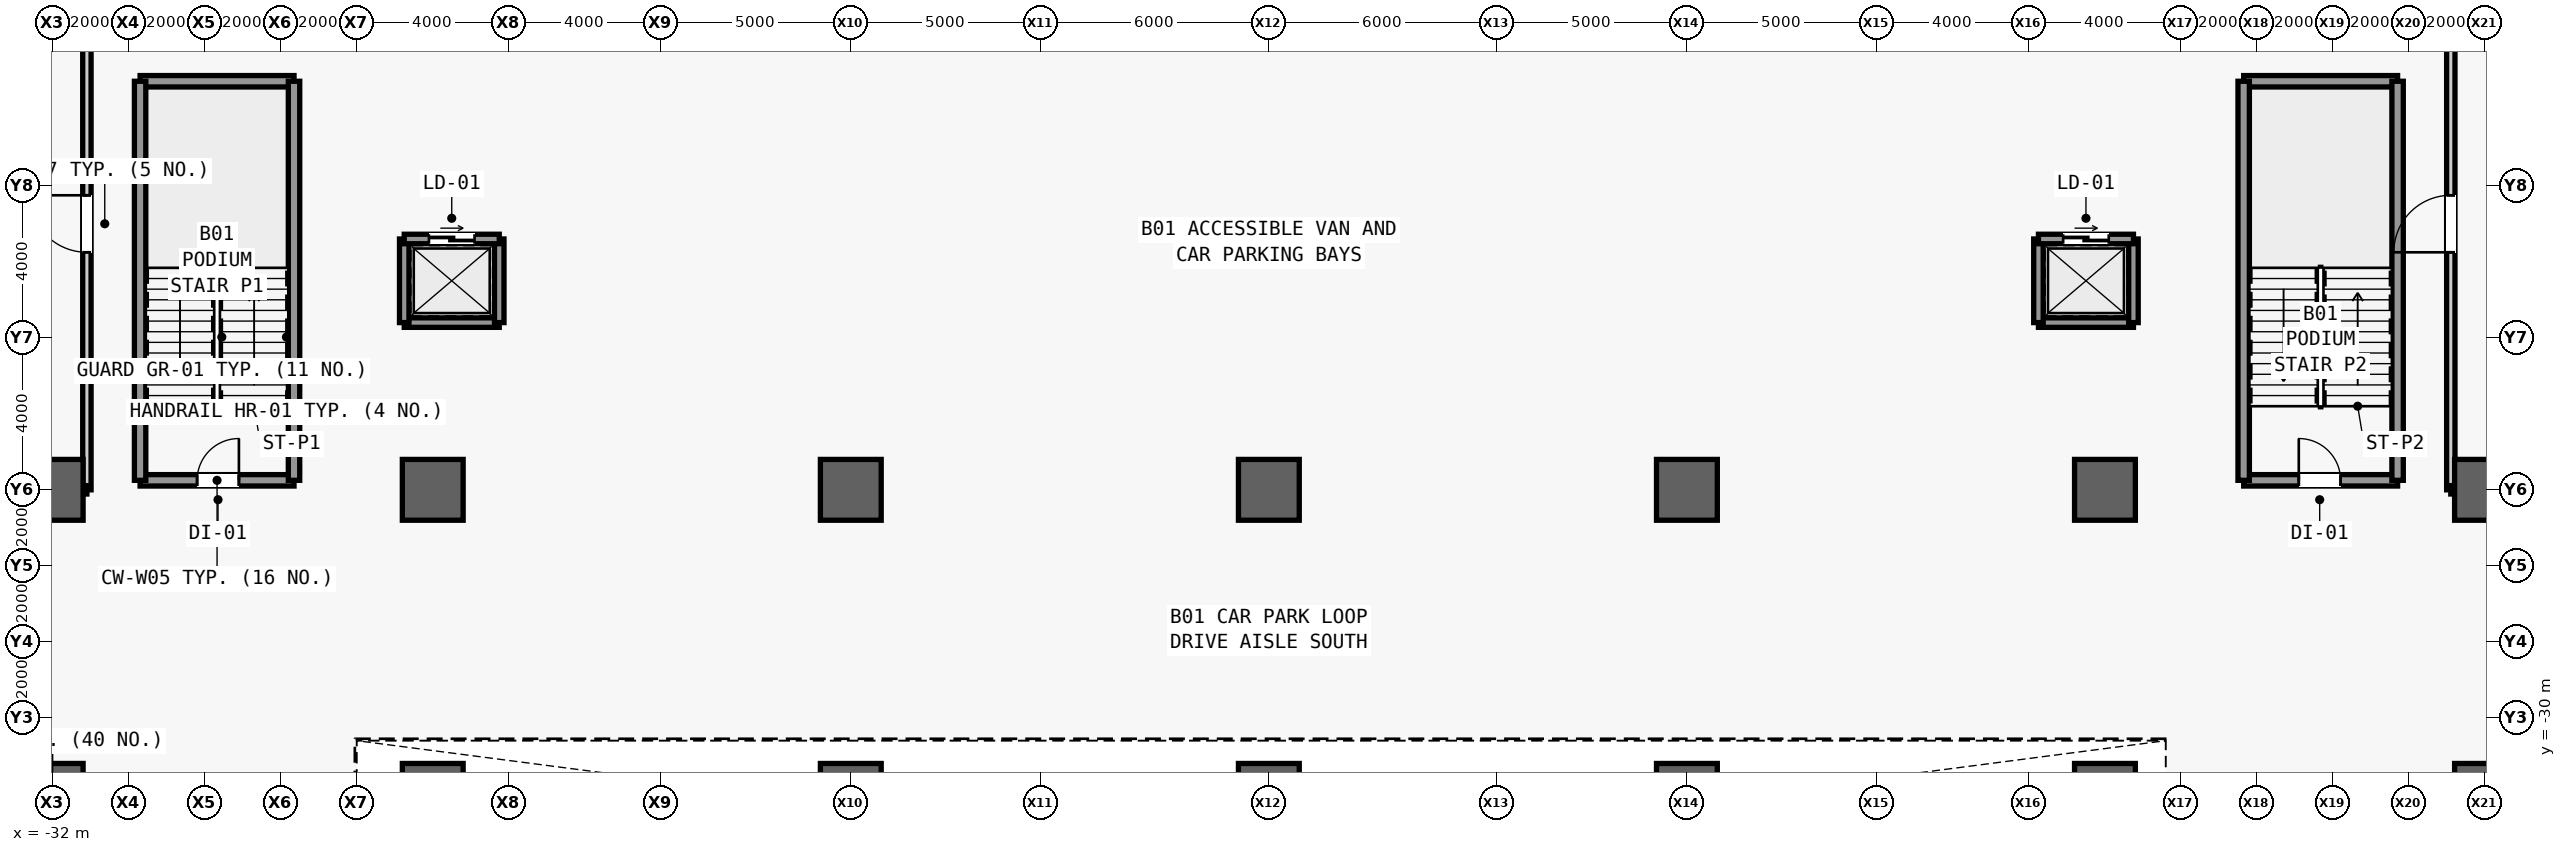
"""IFC4 building model, lengths in metres.
Left out: names, types, materials, properties, quantities, classifications, styles, units other than length and angle.
Written with IfcOpenShell. Run it as: python <this file> out.ifc"""

import sys

from ifc_helpers import new_model, si_unit, direction, frame, frame_2d, origin, origin_2d, place, context, subcontext, project, spatial, rectangle, extrude, source, transform, mapped, element, fill, save


model = new_model("IFC4")
c1 = context("Model", 3, precision=1e-05, world=origin(), true_north=direction((0.0, 1.0)))
c2 = subcontext(c1, "Body", "Model", "MODEL_VIEW")
j1 = project(units=[si_unit("LENGTHUNIT", "METRE"), si_unit("PLANEANGLEUNIT", "RADIAN")], contexts=[c1])
p1 = place(None, origin())
s1 = spatial("IfcSite", under=j1, at=p1, CompositionType="ELEMENT")
p2 = place(p1, origin())
s2 = spatial("IfcBuilding", under=s1, at=p2, CompositionType="ELEMENT")
p3 = place(p2, frame((0.0, 0.0, -4.8)))
s3 = spatial("IfcBuildingStorey", under=s2, at=p3, CompositionType="ELEMENT", Elevation=-4.8)
m1 = source(origin(), c2, "Body", "SweptSolid", [
    extrude(rectangle(XDim=1.6, YDim=1.6, at=origin_2d()), origin(), (0.0, 0.0, 1.0), 4.8),
])
for number, where, z_axis, x_axis in (
    (1, (-32.0, -32.0, 0.0), (0.0, 0.0, 1.0), (1.0, 0.0, 0.0)),
    (2, (-32.0, -24.0, 0.0), (0.0, 0.0, 1.0), (1.0, 0.0, 0.0)),
    (3, (-22.0, -32.0, 0.0), (0.0, 0.0, 1.0), (1.0, 0.0, 0.0)),
    (4, (-22.0, -24.0, 0.0), (0.0, 0.0, 1.0), (1.0, 0.0, 0.0)),
    (5, (-11.0, -32.0, 0.0), (0.0, 0.0, 1.0), (1.0, 0.0, 0.0)),
    (6, (-11.0, -24.0, 0.0), (0.0, 0.0, 1.0), (1.0, 0.0, 0.0)),
    (7, (0.0, -32.0, 0.0), (0.0, 0.0, 1.0), (1.0, 0.0, 0.0)),
    (8, (0.0, -24.0, 0.0), (0.0, 0.0, 1.0), (1.0, 0.0, 0.0)),
    (9, (11.0, -32.0, 0.0), (0.0, 0.0, 1.0), (1.0, 0.0, 0.0)),
    (10, (11.0, -24.0, 0.0), (0.0, 0.0, 1.0), (1.0, 0.0, 0.0)),
    (11, (22.0, -32.0, 0.0), (0.0, 0.0, 1.0), (1.0, 0.0, 0.0)),
    (12, (22.0, -24.0, 0.0), (0.0, 0.0, 1.0), (1.0, 0.0, 0.0)),
    (13, (32.0, -32.0, 0.0), (0.0, 0.0, 1.0), (1.0, 0.0, 0.0)),
    (14, (32.0, -24.0, 0.0), (0.0, 0.0, 1.0), (1.0, 0.0, 0.0)),
):
    element("IfcColumn", number, at=place(p3, frame(where, z_axis=z_axis, x_axis=x_axis)), inside=s3, PredefinedType="COLUMN", context=c2, shape_type="MappedRepresentation", body=[
        mapped(m1, transform((0.0, 0.0, 0.0), scale=1.0)),
    ])
m2 = source(origin(), c2, "Body", "SweptSolid", [
    extrude(rectangle(XDim=4.05, YDim=0.3, at=frame_2d((2.025, 0.0))), origin(), (0.0, 0.0, 1.0), 4.48),
])
p4 = place(p3, frame((-29.7, -23.75, 0.0), z_axis=(0.0, 0.0, 1.0), x_axis=(1.0, 0.0, 0.0)))
e15 = element("IfcWall", 15, at=p4, inside=s3, PredefinedType="SHEAR", context=c2, shape_type="MappedRepresentation", body=[
    mapped(m2, transform((0.0, 0.0, 0.0), scale=1.0)),
])
m3 = source(origin(), c2, "Body", "SweptSolid", [
    extrude(rectangle(XDim=1.1, YDim=2.2, at=frame_2d((0.55, 1.1))), frame((0.0, 0.16, 0.0), z_axis=(0.0, -1.0, 0.0), x_axis=(1.0, 0.0, 0.0)), (0.0, 0.0, 1.0), 0.32),
])
p5 = place(p4, frame((1.5, 0.0, 0.0)))
e16 = element("IfcOpeningElement", 16, at=p5, cuts=e15, PredefinedType="OPENING", context=c2, shape_type="MappedRepresentation", body=[
    mapped(m3, transform((0.0, 0.0, 0.0), scale=1.0)),
])
p6 = place(p3, frame((-29.7, -13.25, 0.0), z_axis=(0.0, 0.0, 1.0), x_axis=(1.0, 0.0, 0.0)))
e17 = element("IfcWall", 17, at=p6, inside=s3, PredefinedType="SHEAR", context=c2, shape_type="MappedRepresentation", body=[
    mapped(m2, transform((0.0, 0.0, 0.0), scale=1.0)),
])
m4 = source(origin(), c2, "Body", "SweptSolid", [
    extrude(rectangle(XDim=10.5, YDim=0.3, at=frame_2d((5.25, 0.0))), origin(), (0.0, 0.0, 1.0), 4.48),
])
for number, where, z_axis, x_axis in (
    (18, (-29.7, -23.75, 0.0), (0.0, 0.0, 1.0), (0.0, 1.0, 0.0)),
    (19, (-25.65, -23.75, 0.0), (0.0, 0.0, 1.0), (0.0, 1.0, 0.0)),
):
    element("IfcWall", number, at=place(p3, frame(where, z_axis=z_axis, x_axis=x_axis)), inside=s3, PredefinedType="SHEAR", context=c2, shape_type="MappedRepresentation", body=[
        mapped(m4, transform((0.0, 0.0, 0.0), scale=1.0)),
    ])
p7 = place(p3, frame((25.65, -23.75, 0.0), z_axis=(0.0, 0.0, 1.0), x_axis=(1.0, 0.0, 0.0)))
e20 = element("IfcWall", 20, at=p7, inside=s3, PredefinedType="SHEAR", context=c2, shape_type="MappedRepresentation", body=[
    mapped(m2, transform((0.0, 0.0, 0.0), scale=1.0)),
])
p8 = place(p7, frame((1.45, 0.0, 0.0)))
e21 = element("IfcOpeningElement", 21, at=p8, cuts=e20, PredefinedType="OPENING", context=c2, shape_type="MappedRepresentation", body=[
    mapped(m3, transform((0.0, 0.0, 0.0), scale=1.0)),
])
p9 = place(p3, frame((25.65, -13.25, 0.0), z_axis=(0.0, 0.0, 1.0), x_axis=(1.0, 0.0, 0.0)))
e22 = element("IfcWall", 22, at=p9, inside=s3, PredefinedType="SHEAR", context=c2, shape_type="MappedRepresentation", body=[
    mapped(m2, transform((0.0, 0.0, 0.0), scale=1.0)),
])
for number, where, z_axis, x_axis in (
    (23, (25.65, -23.75, 0.0), (0.0, 0.0, 1.0), (0.0, 1.0, 0.0)),
    (24, (29.7, -23.75, 0.0), (0.0, 0.0, 1.0), (0.0, 1.0, 0.0)),
):
    element("IfcWall", number, at=place(p3, frame(where, z_axis=z_axis, x_axis=x_axis)), inside=s3, PredefinedType="SHEAR", context=c2, shape_type="MappedRepresentation", body=[
        mapped(m4, transform((0.0, 0.0, 0.0), scale=1.0)),
    ])
m5 = source(origin(), c2, "Body", "SweptSolid", [
    extrude(rectangle(XDim=2.5, YDim=0.25, at=frame_2d((1.25, 0.0))), origin(), (0.0, 0.0, 1.0), 4.48),
])
p10 = place(p3, frame((-22.75, -19.6, 0.0), z_axis=(0.0, 0.0, 1.0), x_axis=(1.0, 0.0, 0.0)))
e25 = element("IfcWall", 25, at=p10, inside=s3, PredefinedType="SHEAR", context=c2, shape_type="MappedRepresentation", body=[
    mapped(m5, transform((0.0, 0.0, 0.0), scale=1.0)),
])
m6 = source(origin(), c2, "Body", "SweptSolid", [
    extrude(rectangle(XDim=2.2, YDim=0.25, at=frame_2d((1.1, 0.0))), origin(), (0.0, 0.0, 1.0), 4.48),
])
for number, where, z_axis, x_axis in (
    (26, (-22.75, -19.6, 0.0), (0.0, 0.0, 1.0), (0.0, 1.0, 0.0)),
    (27, (-20.25, -19.6, 0.0), (0.0, 0.0, 1.0), (0.0, 1.0, 0.0)),
):
    element("IfcWall", number, at=place(p3, frame(where, z_axis=z_axis, x_axis=x_axis)), inside=s3, PredefinedType="SHEAR", context=c2, shape_type="MappedRepresentation", body=[
        mapped(m6, transform((0.0, 0.0, 0.0), scale=1.0)),
    ])
p11 = place(p3, frame((-22.75, -17.4, 0.0), z_axis=(0.0, 0.0, 1.0), x_axis=(1.0, 0.0, 0.0)))
e28 = element("IfcWall", 28, at=p11, inside=s3, PredefinedType="SHEAR", context=c2, shape_type="MappedRepresentation", body=[
    mapped(m5, transform((0.0, 0.0, 0.0), scale=1.0)),
])
m7 = source(origin(), c2, "Body", "SweptSolid", [
    extrude(rectangle(XDim=1.2, YDim=2.3, at=frame_2d((0.6, 1.15))), frame((0.0, 0.135, 0.0), z_axis=(0.0, -1.0, 0.0), x_axis=(1.0, 0.0, 0.0)), (0.0, 0.0, 1.0), 0.27),
])
p12 = place(p11, frame((0.65, 0.0, 0.0)))
e29 = element("IfcOpeningElement", 29, at=p12, cuts=e28, PredefinedType="OPENING", context=c2, shape_type="MappedRepresentation", body=[
    mapped(m7, transform((0.0, 0.0, 0.0), scale=1.0)),
])
p13 = place(p3, frame((20.25, -19.6, 0.0), z_axis=(0.0, 0.0, 1.0), x_axis=(1.0, 0.0, 0.0)))
e30 = element("IfcWall", 30, at=p13, inside=s3, PredefinedType="SHEAR", context=c2, shape_type="MappedRepresentation", body=[
    mapped(m5, transform((0.0, 0.0, 0.0), scale=1.0)),
])
for number, where, z_axis, x_axis in (
    (31, (20.25, -19.6, 0.0), (0.0, 0.0, 1.0), (0.0, 1.0, 0.0)),
    (32, (22.75, -19.6, 0.0), (0.0, 0.0, 1.0), (0.0, 1.0, 0.0)),
):
    element("IfcWall", number, at=place(p3, frame(where, z_axis=z_axis, x_axis=x_axis)), inside=s3, PredefinedType="SHEAR", context=c2, shape_type="MappedRepresentation", body=[
        mapped(m6, transform((0.0, 0.0, 0.0), scale=1.0)),
    ])
p14 = place(p3, frame((20.25, -17.4, 0.0), z_axis=(0.0, 0.0, 1.0), x_axis=(1.0, 0.0, 0.0)))
e33 = element("IfcWall", 33, at=p14, inside=s3, PredefinedType="SHEAR", context=c2, shape_type="MappedRepresentation", body=[
    mapped(m5, transform((0.0, 0.0, 0.0), scale=1.0)),
])
p15 = place(p14, frame((0.65, 0.0, 0.0)))
e34 = element("IfcOpeningElement", 34, at=p15, cuts=e33, PredefinedType="OPENING", context=c2, shape_type="MappedRepresentation", body=[
    mapped(m7, transform((0.0, 0.0, 0.0), scale=1.0)),
])
m8 = source(origin(), c2, "Body", "SweptSolid", [
    extrude(rectangle(XDim=48.0, YDim=0.22, at=frame_2d((24.0, 0.0))), origin(), (0.0, 0.0, 1.0), 4.48),
])
p16 = place(p3, frame((-31.1, -24.0, 0.0), z_axis=(0.0, 0.0, 1.0), x_axis=(0.0, 1.0, 0.0)))
e35 = element("IfcWall", 35, at=p16, inside=s3, PredefinedType="PARTITIONING", context=c2, shape_type="MappedRepresentation", body=[
    mapped(m8, transform((0.0, 0.0, 0.0), scale=1.0)),
])
m9 = source(origin(), c2, "Body", "SweptSolid", [
    extrude(rectangle(XDim=1.5, YDim=2.3, at=frame_2d((0.75, 1.15))), frame((0.0, 0.12, 0.0), z_axis=(0.0, -1.0, 0.0), x_axis=(1.0, 0.0, 0.0)), (0.0, 0.0, 1.0), 0.24),
])
p17 = place(p16, frame((6.25, 0.0, 0.0)))
e36 = element("IfcOpeningElement", 36, at=p17, cuts=e35, PredefinedType="OPENING", context=c2, shape_type="MappedRepresentation", body=[
    mapped(m9, transform((0.0, 0.0, 0.0), scale=1.0)),
])
p18 = place(p16, frame((28.75, 0.0, 0.0)))
e37 = element("IfcOpeningElement", 37, at=p18, cuts=e35, PredefinedType="OPENING", context=c2, shape_type="MappedRepresentation", body=[
    mapped(m9, transform((0.0, 0.0, 0.0), scale=1.0)),
])
p19 = place(p16, frame((40.25, 0.0, 0.0)))
e38 = element("IfcOpeningElement", 38, at=p19, cuts=e35, PredefinedType="OPENING", context=c2, shape_type="MappedRepresentation", body=[
    mapped(m9, transform((0.0, 0.0, 0.0), scale=1.0)),
])
m10 = source(origin(), c2, "Body", "SweptSolid", [
    extrude(rectangle(XDim=14.7, YDim=0.22, at=frame_2d((7.35, 0.0))), origin(), (0.0, 0.0, 1.0), 2.68),
])
p20 = place(p3, frame((-45.8, -24.0, 0.0), z_axis=(0.0, 0.0, 1.0), x_axis=(1.0, 0.0, 0.0)))
e39 = element("IfcWall", 39, at=p20, inside=s3, PredefinedType="PARTITIONING", context=c2, shape_type="MappedRepresentation", body=[
    mapped(m10, transform((0.0, 0.0, 0.0), scale=1.0)),
])
p21 = place(p3, frame((31.1, -24.0, 0.0), z_axis=(0.0, 0.0, 1.0), x_axis=(0.0, 1.0, 0.0)))
e40 = element("IfcWall", 40, at=p21, inside=s3, PredefinedType="PARTITIONING", context=c2, shape_type="MappedRepresentation", body=[
    mapped(m8, transform((0.0, 0.0, 0.0), scale=1.0)),
])
p22 = place(p21, frame((6.25, 0.0, 0.0)))
e41 = element("IfcOpeningElement", 41, at=p22, cuts=e40, PredefinedType="OPENING", context=c2, shape_type="MappedRepresentation", body=[
    mapped(m9, transform((0.0, 0.0, 0.0), scale=1.0)),
])
p23 = place(p21, frame((40.25, 0.0, 0.0)))
e42 = element("IfcOpeningElement", 42, at=p23, cuts=e40, PredefinedType="OPENING", context=c2, shape_type="MappedRepresentation", body=[
    mapped(m9, transform((0.0, 0.0, 0.0), scale=1.0)),
])
p24 = place(p3, frame((31.1, -24.0, 0.0), z_axis=(0.0, 0.0, 1.0), x_axis=(1.0, 0.0, 0.0)))
e43 = element("IfcWall", 43, at=p24, inside=s3, PredefinedType="PARTITIONING", context=c2, shape_type="MappedRepresentation", body=[
    mapped(m10, transform((0.0, 0.0, 0.0), scale=1.0)),
])
m11 = source(origin(), c2, "Body", "SweptSolid", [
    extrude(rectangle(XDim=1.1, YDim=2.2, at=frame_2d((0.55, 1.1))), frame((0.0, 0.025, 0.0), z_axis=(0.0, -1.0, 0.0), x_axis=(1.0, 0.0, 0.0)), (0.0, 0.0, 1.0), 0.05),
])
p25 = place(p5, origin())
e44 = element("IfcDoor", 44, at=p25, inside=s3, OperationType="SINGLE_SWING_RIGHT", PredefinedType="DOOR", context=c2, shape_type="MappedRepresentation", body=[
    mapped(m11, transform((0.0, 0.0, 0.0), scale=1.0)),
])
fill(e16, e44)
p26 = place(p8, origin())
e45 = element("IfcDoor", 45, at=p26, inside=s3, OperationType="SINGLE_SWING_LEFT", PredefinedType="DOOR", context=c2, shape_type="MappedRepresentation", body=[
    mapped(m11, transform((0.0, 0.0, 0.0), scale=1.0)),
])
fill(e21, e45)
m12 = source(origin(), c2, "Body", "SweptSolid", [
    extrude(rectangle(XDim=1.5, YDim=2.3, at=frame_2d((0.75, 1.15))), frame((0.0, 0.025, 0.0), z_axis=(0.0, -1.0, 0.0), x_axis=(1.0, 0.0, 0.0)), (0.0, 0.0, 1.0), 0.05),
])
p27 = place(p17, origin())
e46 = element("IfcDoor", 46, at=p27, inside=s3, OperationType="SINGLE_SWING_RIGHT", PredefinedType="DOOR", context=c2, shape_type="MappedRepresentation", body=[
    mapped(m12, transform((0.0, 0.0, 0.0), scale=1.0)),
])
fill(e36, e46)
p28 = place(p22, origin())
e47 = element("IfcDoor", 47, at=p28, inside=s3, OperationType="SINGLE_SWING_LEFT", PredefinedType="DOOR", context=c2, shape_type="MappedRepresentation", body=[
    mapped(m12, transform((0.0, 0.0, 0.0), scale=1.0)),
])
fill(e41, e47)
m13 = source(origin(), c2, "Body", "SweptSolid", [
    extrude(rectangle(XDim=1.2, YDim=2.3, at=frame_2d((0.6, 1.15))), frame((0.0, 0.025, 0.0), z_axis=(0.0, -1.0, 0.0), x_axis=(1.0, 0.0, 0.0)), (0.0, 0.0, 1.0), 0.05),
])
p29 = place(p12, origin())
e48 = element("IfcDoor", 48, at=p29, inside=s3, OperationType="SLIDING_TO_LEFT", PredefinedType="DOOR", context=c2, shape_type="MappedRepresentation", body=[
    mapped(m13, transform((0.0, 0.0, 0.0), scale=1.0)),
])
fill(e29, e48)
p30 = place(p15, origin())
e49 = element("IfcDoor", 49, at=p30, inside=s3, OperationType="SLIDING_TO_LEFT", PredefinedType="DOOR", context=c2, shape_type="MappedRepresentation", body=[
    mapped(m13, transform((0.0, 0.0, 0.0), scale=1.0)),
])
fill(e34, e49)
save(model, sys.argv[1])
